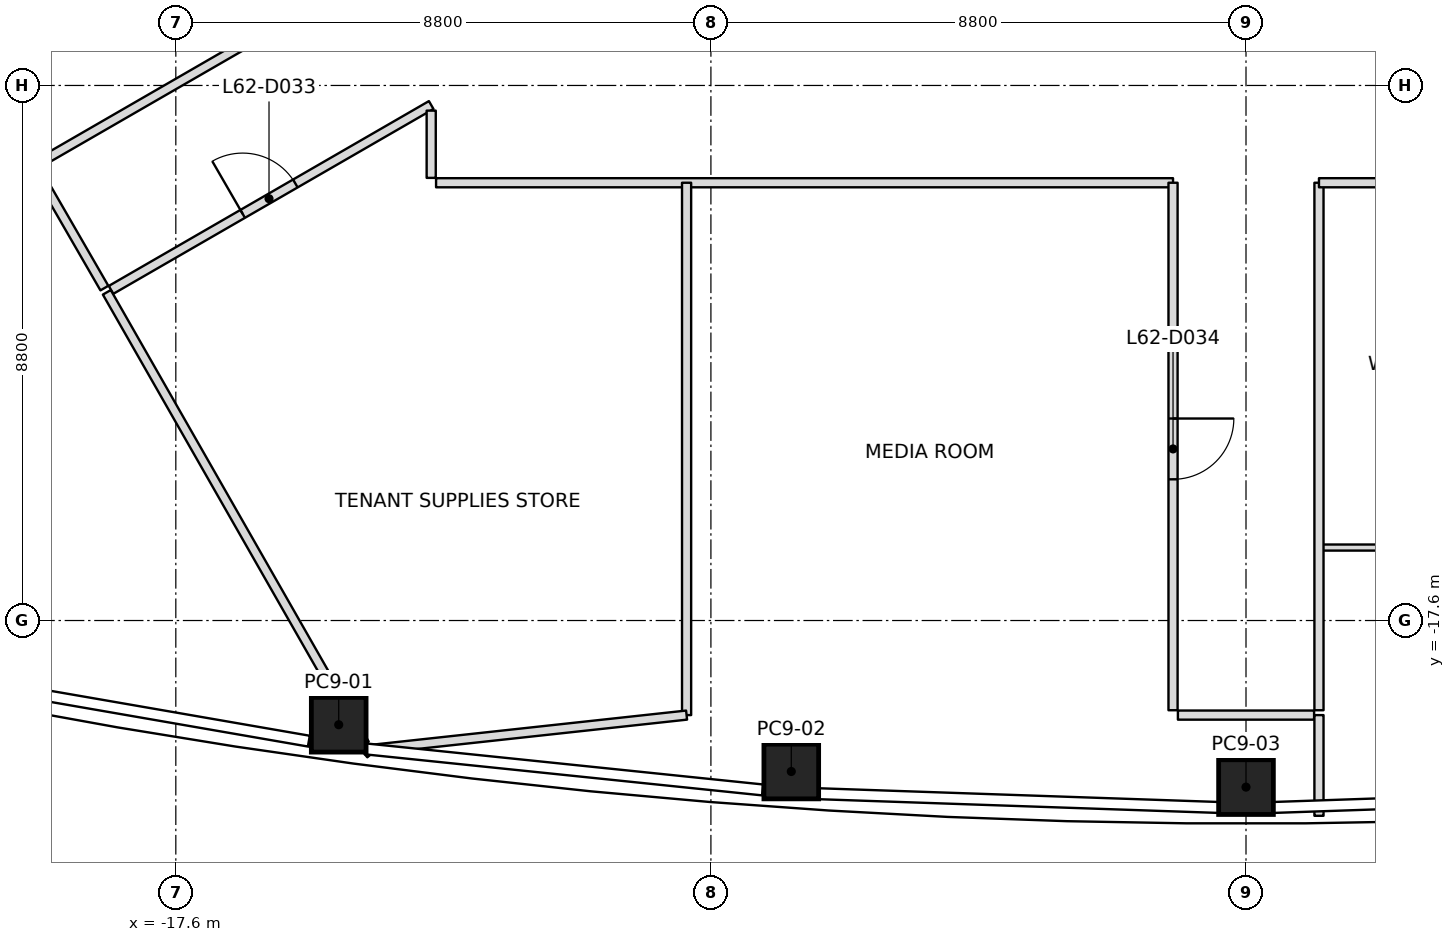
"""IFC4 building model, lengths in metres.
Left out: names, types, materials, properties, quantities, classifications, styles, units other than length and angle.
Written with IfcOpenShell. Run it as: python <this file> out.ifc"""

import sys

from ifc_helpers import new_model, si_unit, direction, frame, frame_2d, origin, origin_2d, place, context, subcontext, project, spatial, rectangle, extrude, element, fill, save


model = new_model("IFC4")
c1 = context("Model", 3, precision=1e-05, world=origin(), true_north=direction((0.0, 1.0)))
c2 = subcontext(c1, "Body", "Model", "MODEL_VIEW")
j1 = project(units=[si_unit("LENGTHUNIT", "METRE"), si_unit("PLANEANGLEUNIT", "RADIAN")], contexts=[c1])
p1 = place(None, origin())
s1 = spatial("IfcSite", under=j1, at=p1, CompositionType="ELEMENT")
p2 = place(p1, origin())
s2 = spatial("IfcBuilding", under=s1, at=p2, CompositionType="ELEMENT")
p3 = place(p2, frame((0.0, 0.0, 275.0)))
s3 = spatial("IfcBuildingStorey", under=s2, at=p3, CompositionType="ELEMENT", Elevation=275.0)
p4 = place(p3, frame((-14.921, -19.314, 0.0), z_axis=(0.017452456582, 0.010373837829, 0.999793876381), x_axis=(-0.990437350176, 0.137047764471, 0.015867124157)))
e1 = element("IfcColumn", 1, at=p4, inside=s3, PredefinedType="COLUMN", context=c2, shape_type="SweptSolid", body=[
    extrude(rectangle(XDim=0.9, YDim=0.9, at=origin_2d()), origin(), (0.0, 0.0, 1.0), 4.001),
])
p5 = place(p3, frame((-7.478, -20.083, 0.0), z_axis=(0.008788174922, 0.01116830563, 0.999899013366), x_axis=(-0.997605695254, 0.068693994382, 0.008000745797)))
e2 = element("IfcColumn", 2, at=p5, inside=s3, PredefinedType="COLUMN", context=c2, shape_type="SweptSolid", body=[
    extrude(rectangle(XDim=0.9, YDim=0.9, at=origin_2d()), origin(), (0.0, 0.0, 1.0), 4.0),
])
p6 = place(p3, frame((0.0, -20.34, 0.0), z_axis=(0.0, 0.011473854038, 0.99993417317), x_axis=(1.0, 0.0, 0.0)))
e3 = element("IfcColumn", 3, at=p6, inside=s3, PredefinedType="COLUMN", context=c2, shape_type="SweptSolid", body=[
    extrude(rectangle(XDim=0.9, YDim=0.9, at=origin_2d()), origin(), (0.0, 0.0, 1.0), 4.0),
])
p7 = place(p3, frame((-18.735, -12.202, 0.0), z_axis=(0.0, 0.0, 1.0), x_axis=(0.495972918393, -0.868337989622, 0.0)))
e4 = element("IfcWall", 4, at=p7, inside=s3, PredefinedType="PARTITIONING", context=c2, shape_type="SweptSolid", body=[
    extrude(rectangle(XDim=8.552, YDim=0.15, at=frame_2d((4.276, 0.0))), origin(), (0.0, 0.0, 1.0), 3.45),
])
p8 = place(p3, frame((-9.2, -10.4, 0.0), z_axis=(0.0, 0.0, 1.0), x_axis=(0.0, -1.0, 0.0)))
e5 = element("IfcWall", 5, at=p8, inside=s3, PredefinedType="PARTITIONING", context=c2, shape_type="SweptSolid", body=[
    extrude(rectangle(XDim=8.756, YDim=0.15, at=frame_2d((4.378, 0.0))), origin(), (0.0, 0.0, 1.0), 3.45),
])
p9 = place(p3, frame((-9.2, -19.156, 0.0), z_axis=(0.0, 0.0, 1.0), x_axis=(-0.994133216404, -0.108162600019, 0.0)))
e6 = element("IfcWall", 6, at=p9, inside=s3, PredefinedType="PARTITIONING", context=c2, shape_type="SweptSolid", body=[
    extrude(rectangle(XDim=5.173, YDim=0.15, at=frame_2d((2.587, 0.0))), origin(), (0.0, 0.0, 1.0), 3.234),
])
p10 = place(p3, frame((-14.393, -19.802, 0.0), z_axis=(0.0, 0.0, 1.0), x_axis=(-0.639087334009, 0.769134175232, 0.0)))
e7 = element("IfcWall", 7, at=p10, inside=s3, PredefinedType="PARTITIONING", context=c2, shape_type="SweptSolid", body=[
    extrude(rectangle(XDim=0.197, YDim=0.15, at=frame_2d((0.099, 0.0))), origin(), (0.0, 0.0, 1.0), 3.45),
])
p11 = place(p3, frame((1.2, -19.156, 0.0), z_axis=(0.0, 0.0, 1.0), x_axis=(0.0, -1.0, 0.0)))
e8 = element("IfcWall", 8, at=p11, inside=s3, PredefinedType="PARTITIONING", context=c2, shape_type="SweptSolid", body=[
    extrude(rectangle(XDim=1.656, YDim=0.15, at=frame_2d((0.828, 0.0))), origin(), (0.0, 0.0, 1.0), 3.234),
])
p12 = place(p3, frame((-19.895, -10.193, 0.0), z_axis=(0.0, 0.0, 1.0), x_axis=(0.49994888933, -0.866054910533, 0.0)))
e9 = element("IfcWall", 9, at=p12, inside=s3, PredefinedType="PARTITIONING", context=c2, shape_type="SweptSolid", body=[
    extrude(rectangle(XDim=2.24, YDim=0.15, at=frame_2d((1.12, 0.0))), origin(), (0.0, 0.0, 1.0), 3.233),
])
p13 = place(p3, frame((-13.4, -6.351, 0.0), z_axis=(0.0, 0.0, 1.0), x_axis=(-0.86603092396, -0.499990438654, 0.0)))
e10 = element("IfcWall", 10, at=p13, inside=s3, PredefinedType="PARTITIONING", context=c2, shape_type="SweptSolid", body=[
    extrude(rectangle(XDim=7.466, YDim=0.15, at=frame_2d((3.733, 0.0))), origin(), (0.0, 0.0, 1.0), 3.317),
])
p14 = place(p3, frame((-18.665, -12.162, 0.0), z_axis=(0.0, 0.0, 1.0), x_axis=(0.866020417952, 0.500008635616, 0.0)))
e11 = element("IfcWall", 11, at=p14, inside=s3, PredefinedType="PARTITIONING", context=c2, shape_type="SweptSolid", body=[
    extrude(rectangle(XDim=6.08, YDim=0.15, at=frame_2d((3.04, 0.0))), origin(), (0.0, 0.0, 1.0), 3.233),
])
p15 = place(p14, frame((2.5, 0.0, 0.0)))
e12 = element("IfcOpeningElement", 12, at=p15, cuts=e11, PredefinedType="OPENING", context=c2, shape_type="SweptSolid", body=[
    extrude(rectangle(XDim=1.0, YDim=2.1, at=frame_2d((0.5, 1.05))), frame((0.0, 0.075, 0.0), z_axis=(0.0, -1.0, 0.0), x_axis=(1.0, 0.0, 0.0)), (0.0, 0.0, 1.0), 0.15),
])
p16 = place(p3, frame((-13.4, -9.214, 0.0), z_axis=(0.0, 0.0, 1.0), x_axis=(0.0, -1.0, 0.0)))
e13 = element("IfcWall", 13, at=p16, inside=s3, PredefinedType="PARTITIONING", context=c2, shape_type="SweptSolid", body=[
    extrude(rectangle(XDim=1.106, YDim=0.15, at=frame_2d((0.553, 0.0))), origin(), (0.0, 0.0, 1.0), 3.233),
])
p17 = place(p3, frame((-13.32, -10.4, 0.0), z_axis=(0.0, 0.0, 1.0), x_axis=(1.0, 0.0, 0.0)))
e14 = element("IfcWall", 14, at=p17, inside=s3, PredefinedType="PARTITIONING", context=c2, shape_type="SweptSolid", body=[
    extrude(rectangle(XDim=12.12, YDim=0.15, at=frame_2d((6.06, 0.0))), origin(), (0.0, 0.0, 1.0), 3.317),
])
p18 = place(p3, frame((-1.2, -10.4, 0.0), z_axis=(0.0, 0.0, 1.0), x_axis=(0.0, -1.0, 0.0)))
e15 = element("IfcWall", 15, at=p18, inside=s3, PredefinedType="PARTITIONING", context=c2, shape_type="SweptSolid", body=[
    extrude(rectangle(XDim=8.676, YDim=0.15, at=frame_2d((4.338, 0.0))), origin(), (0.0, 0.0, 1.0), 3.45),
])
p19 = place(p18, frame((3.878, 0.0, 0.0)))
e16 = element("IfcOpeningElement", 16, at=p19, cuts=e15, PredefinedType="OPENING", context=c2, shape_type="SweptSolid", body=[
    extrude(rectangle(XDim=1.0, YDim=2.1, at=frame_2d((0.5, 1.05))), frame((0.0, 0.075, 0.0), z_axis=(0.0, -1.0, 0.0), x_axis=(1.0, 0.0, 0.0)), (0.0, 0.0, 1.0), 0.15),
])
p20 = place(p3, frame((-1.12, -19.156, 0.0), z_axis=(0.0, 0.0, 1.0), x_axis=(1.0, 0.0, 0.0)))
e17 = element("IfcWall", 17, at=p20, inside=s3, PredefinedType="PARTITIONING", context=c2, shape_type="SweptSolid", body=[
    extrude(rectangle(XDim=2.24, YDim=0.15, at=frame_2d((1.12, 0.0))), origin(), (0.0, 0.0, 1.0), 3.45),
])
p21 = place(p3, frame((1.2, -19.076, 0.0), z_axis=(0.0, 0.0, 1.0), x_axis=(0.0, 1.0, 0.0)))
e18 = element("IfcWall", 18, at=p21, inside=s3, PredefinedType="PARTITIONING", context=c2, shape_type="SweptSolid", body=[
    extrude(rectangle(XDim=8.676, YDim=0.15, at=frame_2d((4.338, 0.0))), origin(), (0.0, 0.0, 1.0), 3.45),
])
p22 = place(p3, frame((1.2, -10.4, 0.0), z_axis=(0.0, 0.0, 1.0), x_axis=(1.0, 0.0, 0.0)))
e19 = element("IfcWall", 19, at=p22, inside=s3, PredefinedType="PARTITIONING", context=c2, shape_type="SweptSolid", body=[
    extrude(rectangle(XDim=12.12, YDim=0.15, at=frame_2d((6.06, 0.0))), origin(), (0.0, 0.0, 1.0), 3.317),
])
p23 = place(p22, frame((2.05, 0.0, 0.0)))
e20 = element("IfcOpeningElement", 20, at=p23, cuts=e19, PredefinedType="OPENING", context=c2, shape_type="SweptSolid", body=[
    extrude(rectangle(XDim=0.9, YDim=2.1, at=frame_2d((0.45, 1.05))), frame((0.0, 0.075, 0.0), z_axis=(0.0, -1.0, 0.0), x_axis=(1.0, 0.0, 0.0)), (0.0, 0.0, 1.0), 0.15),
])
p24 = place(p22, frame((8.15, 0.0, 0.0)))
e21 = element("IfcOpeningElement", 21, at=p24, cuts=e19, PredefinedType="OPENING", context=c2, shape_type="SweptSolid", body=[
    extrude(rectangle(XDim=1.0, YDim=2.1, at=frame_2d((0.5, 1.05))), frame((0.0, 0.075, 0.0), z_axis=(0.0, -1.0, 0.0), x_axis=(1.0, 0.0, 0.0)), (0.0, 0.0, 1.0), 0.15),
])
p25 = place(p3, frame((6.2, -16.4, 0.0), z_axis=(0.0, 0.0, 1.0), x_axis=(-1.0, 0.0, 0.0)))
e22 = element("IfcWall", 22, at=p25, inside=s3, PredefinedType="PARTITIONING", context=c2, shape_type="SweptSolid", body=[
    extrude(rectangle(XDim=4.97, YDim=0.1, at=frame_2d((2.485, 0.0))), origin(), (0.0, 0.0, 1.0), 3.317),
])
p26 = place(p15, origin())
e23 = element("IfcDoor", 23, at=p26, inside=s3, OperationType="SINGLE_SWING_LEFT", PredefinedType="DOOR", context=c2, shape_type="SweptSolid", body=[
    extrude(rectangle(XDim=1.0, YDim=2.1, at=frame_2d((0.5, 1.05))), frame((0.0, 0.025, 0.0), z_axis=(0.0, -1.0, 0.0), x_axis=(1.0, 0.0, 0.0)), (0.0, 0.0, 1.0), 0.05),
])
fill(e12, e23)
p27 = place(p19, origin())
e24 = element("IfcDoor", 24, at=p27, inside=s3, OperationType="SINGLE_SWING_RIGHT", PredefinedType="DOOR", context=c2, shape_type="SweptSolid", body=[
    extrude(rectangle(XDim=1.0, YDim=2.1, at=frame_2d((0.5, 1.05))), frame((0.0, 0.025, 0.0), z_axis=(0.0, -1.0, 0.0), x_axis=(1.0, 0.0, 0.0)), (0.0, 0.0, 1.0), 0.05),
])
fill(e16, e24)
save(model, sys.argv[1])
